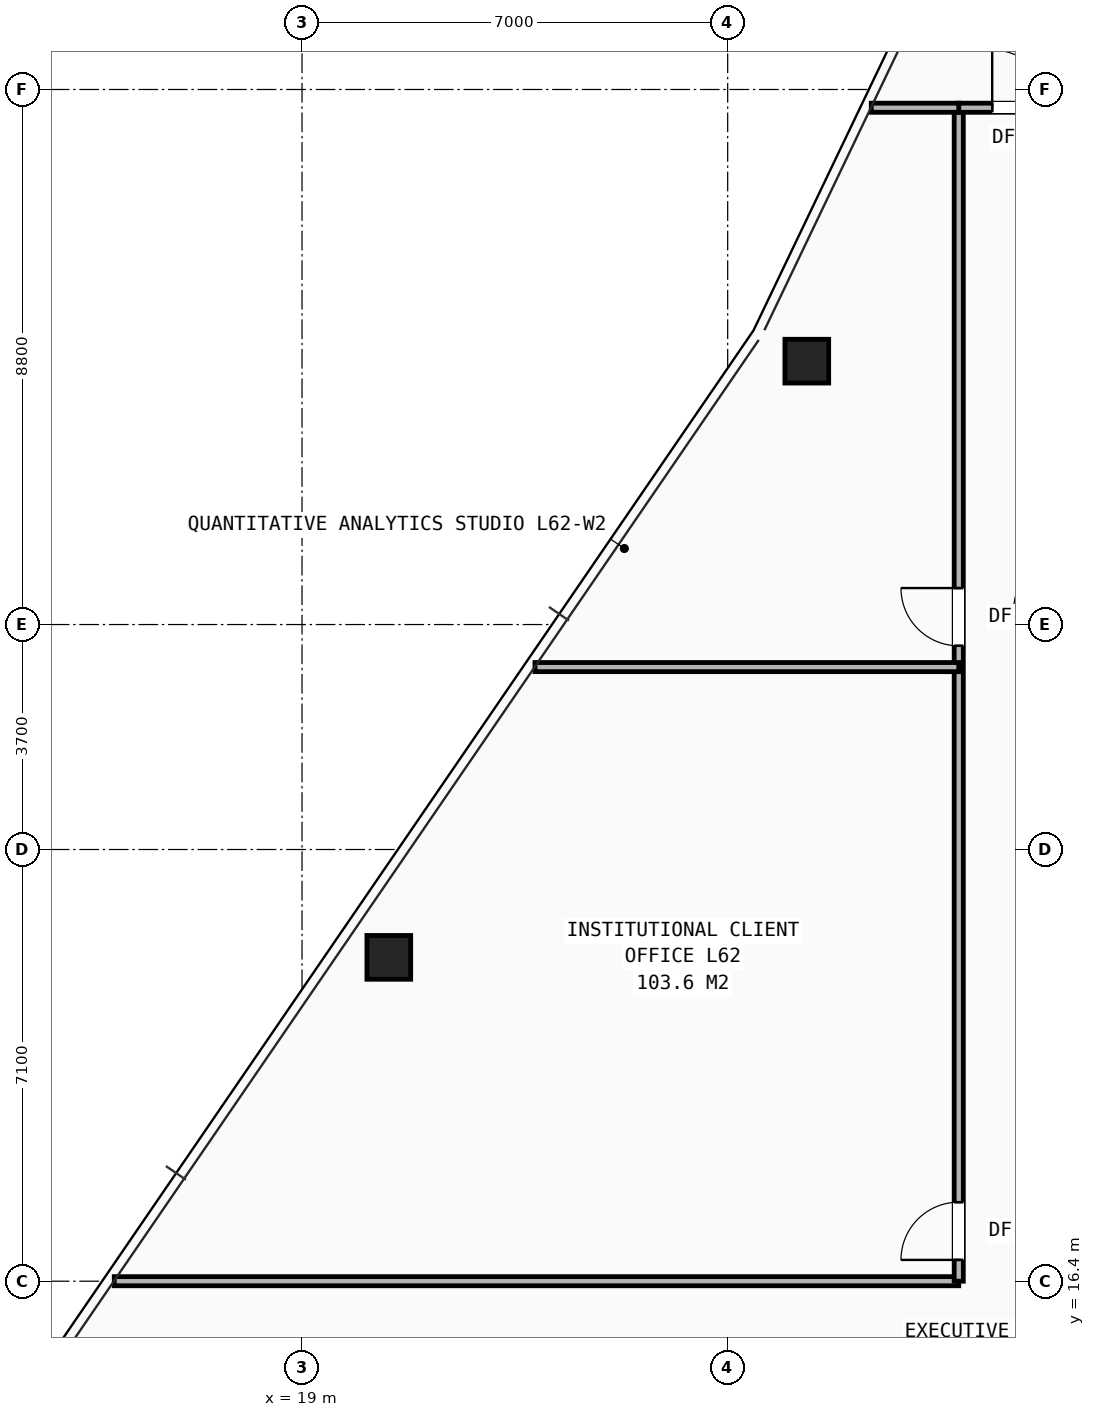
"""IFC4 building model, lengths in metres.
Left out: names, types, materials, properties, quantities, classifications, styles, units other than length and angle.
Written with IfcOpenShell. Run it as: python <this file> out.ifc"""

import sys

from ifc_helpers import new_model, si_unit, direction, frame, frame_2d, origin, origin_2d, place, context, subcontext, project, spatial, rectangle, hollow_rectangle, extrude, element, fill, save


model = new_model("IFC4")
c1 = context("Model", 3, precision=1e-05, world=origin(), true_north=direction((0.0, 1.0)))
c2 = subcontext(c1, "Body", "Model", "MODEL_VIEW")
j1 = project(units=[si_unit("LENGTHUNIT", "METRE"), si_unit("PLANEANGLEUNIT", "RADIAN")], contexts=[c1])
p1 = place(None, origin())
s1 = spatial("IfcSite", under=j1, at=p1, CompositionType="ELEMENT")
p2 = place(p1, origin())
s2 = spatial("IfcBuilding", under=s1, at=p2, CompositionType="ELEMENT")
p3 = place(p2, frame((0.0, 0.0, 218.9)))
s3 = spatial("IfcBuildingStorey", under=s2, at=p3, CompositionType="ELEMENT", Elevation=218.9)
for number, where, z_axis, x_axis in (
    (1, (27.301, 31.532, 0.0), (0.0, 0.0, 1.0), (1.0, 0.0, 0.0)),
    (2, (20.427, 21.726, 0.0), (0.0, 0.0, 1.0), (1.0, 0.0, 0.0)),
):
    element("IfcColumn", number, at=place(p3, frame(where, z_axis=z_axis, x_axis=x_axis)), inside=s3, PredefinedType="COLUMN", context=c2, shape_type="SweptSolid", body=[
        extrude(hollow_rectangle(XDim=0.72, YDim=0.72, WallThickness=0.05, at=origin_2d()), origin(), (0.0, 0.0, 1.0), 3.5),
    ])
p4 = place(p3, frame((15.912, 16.4, 0.0), z_axis=(0.0, 0.0, 1.0), x_axis=(1.0, 0.0, 0.0)))
e3 = element("IfcWall", 3, at=p4, inside=s3, PredefinedType="PARTITIONING", context=c2, shape_type="SweptSolid", body=[
    extrude(rectangle(XDim=13.888, YDim=0.15, at=frame_2d((6.944, 0.0))), origin(), (0.0, 0.0, 1.0), 2.292),
])
p5 = place(p3, frame((29.8, 16.4, 0.0), z_axis=(0.0, 0.0, 1.0), x_axis=(0.0, 1.0, 0.0)))
e4 = element("IfcWall", 4, at=p5, inside=s3, PredefinedType="PARTITIONING", context=c2, shape_type="SweptSolid", body=[
    extrude(rectangle(XDim=19.3, YDim=0.15, at=frame_2d((9.65, 0.0))), origin(), (0.0, 0.0, 1.0), 2.292),
])
p6 = place(p5, frame((0.35, 0.0, 0.0)))
e5 = element("IfcOpeningElement", 5, at=p6, cuts=e4, PredefinedType="OPENING", context=c2, shape_type="SweptSolid", body=[
    extrude(rectangle(XDim=0.95, YDim=2.1, at=frame_2d((0.475, 1.05))), frame((0.0, 0.085, 0.0), z_axis=(0.0, -1.0, 0.0), x_axis=(1.0, 0.0, 0.0)), (0.0, 0.0, 1.0), 0.17),
])
p7 = place(p5, frame((10.45, 0.0, 0.0)))
e6 = element("IfcOpeningElement", 6, at=p7, cuts=e4, PredefinedType="OPENING", context=c2, shape_type="SweptSolid", body=[
    extrude(rectangle(XDim=0.95, YDim=2.1, at=frame_2d((0.475, 1.05))), frame((0.0, 0.085, 0.0), z_axis=(0.0, -1.0, 0.0), x_axis=(1.0, 0.0, 0.0)), (0.0, 0.0, 1.0), 0.17),
])
p8 = place(p3, frame((29.8, 35.7, 0.0), z_axis=(0.0, 0.0, 1.0), x_axis=(1.0, 0.0, 0.0)))
e7 = element("IfcWall", 7, at=p8, inside=s3, PredefinedType="PARTITIONING", context=c2, shape_type="SweptSolid", body=[
    extrude(rectangle(XDim=9.45, YDim=0.15, at=frame_2d((4.725, 0.0))), origin(), (0.0, 0.0, 1.0), 2.833),
])
p9 = place(p8, frame((0.55, 0.0, 0.0)))
e8 = element("IfcOpeningElement", 8, at=p9, cuts=e7, PredefinedType="OPENING", context=c2, shape_type="SweptSolid", body=[
    extrude(rectangle(XDim=0.95, YDim=2.1, at=frame_2d((0.475, 1.05))), frame((0.0, 0.085, 0.0), z_axis=(0.0, -1.0, 0.0), x_axis=(1.0, 0.0, 0.0)), (0.0, 0.0, 1.0), 0.17),
])
p10 = place(p3, frame((28.361, 35.7, 0.0), z_axis=(0.0, 0.0, 1.0), x_axis=(1.0, 0.0, 0.0)))
e9 = element("IfcWall", 9, at=p10, inside=s3, PredefinedType="PARTITIONING", context=c2, shape_type="SweptSolid", body=[
    extrude(rectangle(XDim=1.439, YDim=0.15, at=frame_2d((0.719, 0.0))), origin(), (0.0, 0.0, 1.0), 2.628),
])
p11 = place(p3, frame((22.831, 26.5, 0.0), z_axis=(0.0, 0.0, 1.0), x_axis=(1.0, 0.0, 0.0)))
e10 = element("IfcWall", 10, at=p11, inside=s3, PredefinedType="PARTITIONING", context=c2, shape_type="SweptSolid", body=[
    extrude(rectangle(XDim=6.969, YDim=0.15, at=frame_2d((3.484, 0.0))), origin(), (0.0, 0.0, 1.0), 2.628),
])
p12 = place(p6, origin())
e11 = element("IfcDoor", 11, at=p12, inside=s3, OperationType="SINGLE_SWING_LEFT", PredefinedType="DOOR", context=c2, shape_type="SweptSolid", body=[
    extrude(rectangle(XDim=0.95, YDim=2.1, at=frame_2d((0.475, 1.05))), frame((0.0, 0.025, 0.0), z_axis=(0.0, -1.0, 0.0), x_axis=(1.0, 0.0, 0.0)), (0.0, 0.0, 1.0), 0.05),
])
fill(e5, e11)
p13 = place(p7, origin())
e12 = element("IfcDoor", 12, at=p13, inside=s3, OperationType="SINGLE_SWING_RIGHT", PredefinedType="DOOR", context=c2, shape_type="SweptSolid", body=[
    extrude(rectangle(XDim=0.95, YDim=2.1, at=frame_2d((0.475, 1.05))), frame((0.0, 0.025, 0.0), z_axis=(0.0, -1.0, 0.0), x_axis=(1.0, 0.0, 0.0)), (0.0, 0.0, 1.0), 0.05),
])
fill(e6, e12)
p14 = place(p9, origin())
e13 = element("IfcDoor", 13, at=p14, inside=s3, OperationType="SINGLE_SWING_LEFT", PredefinedType="DOOR", context=c2, shape_type="SweptSolid", body=[
    extrude(rectangle(XDim=0.95, YDim=2.1, at=frame_2d((0.475, 1.05))), frame((0.0, 0.025, 0.0), z_axis=(0.0, -1.0, 0.0), x_axis=(1.0, 0.0, 0.0)), (0.0, 0.0, 1.0), 0.05),
])
fill(e8, e13)
save(model, sys.argv[1])
